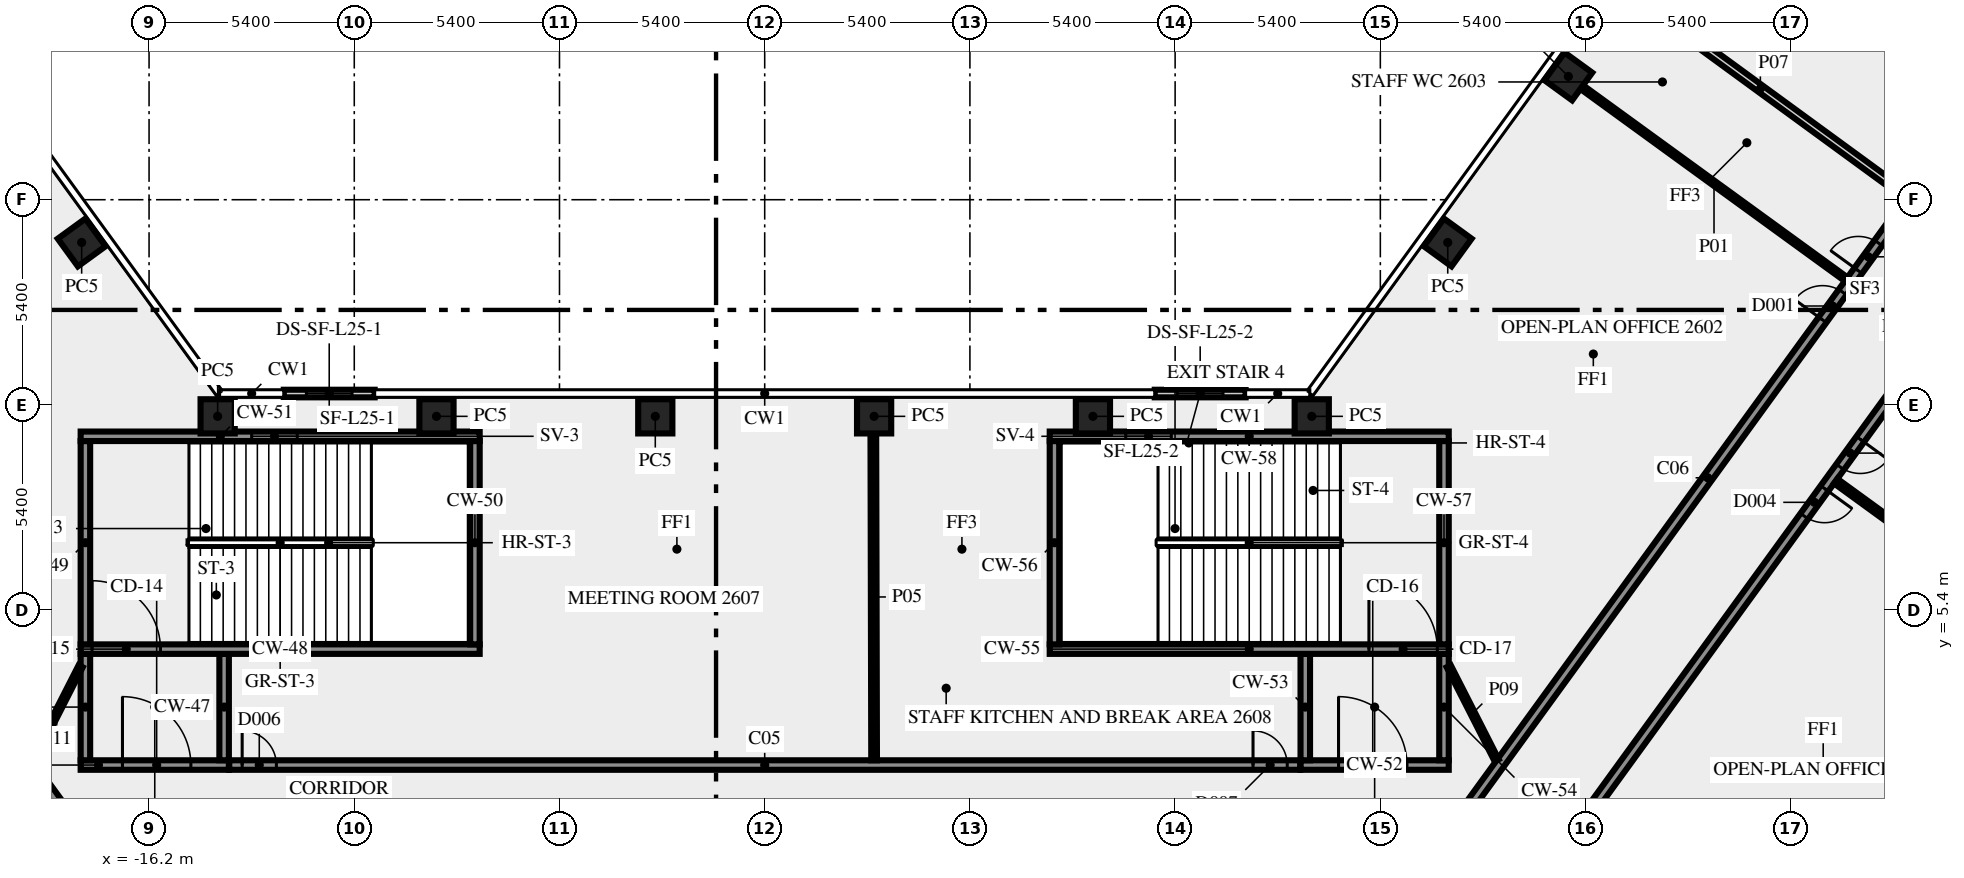
"""IFC4 building model, lengths in metres.
Left out: names, types, materials, properties, quantities, classifications, styles, units other than length and angle.
Written with IfcOpenShell. Run it as: python <this file> out.ifc"""

import sys

from ifc_helpers import new_model, si_unit, direction, frame, frame_2d, origin, origin_2d, place, context, subcontext, project, spatial, rectangle, extrude, element, fill, save


model = new_model("IFC4")
c1 = context("Model", 3, precision=1e-05, world=origin(), true_north=direction((0.0, 1.0)))
c2 = subcontext(c1, "Body", "Model", "MODEL_VIEW")
j1 = project(units=[si_unit("LENGTHUNIT", "METRE"), si_unit("PLANEANGLEUNIT", "RADIAN")], contexts=[c1])
p1 = place(None, origin())
s1 = spatial("IfcSite", under=j1, at=p1, CompositionType="ELEMENT")
p2 = place(p1, origin())
s2 = spatial("IfcBuilding", under=s1, at=p2, CompositionType="ELEMENT")
p3 = place(p2, frame((0.0, 0.0, 113.0)))
s3 = spatial("IfcBuildingStorey", under=s2, at=p3, CompositionType="ELEMENT", Elevation=113.0)
for number, where, z_axis, x_axis in (
    (1, (-17.974, 15.075, 0.0), (0.0, 0.0, 1.0), (-0.588, 0.809, 0.0)),
    (2, (21.147, 19.444, 0.0), (0.0, 0.0, 1.0), (-0.588, -0.809, 0.0)),
    (3, (17.974, 15.075, 0.0), (0.0, 0.0, 1.0), (-0.588, -0.809, 0.0)),
    (4, (14.395, 10.5, 0.0), (0.0, 0.0, 1.0), (-1.0, 0.0, 0.0)),
    (5, (8.637, 10.5, 0.0), (0.0, 0.0, 1.0), (-1.0, 0.0, 0.0)),
    (6, (2.879, 10.5, 0.0), (0.0, 0.0, 1.0), (-1.0, 0.0, 0.0)),
    (7, (-2.879, 10.5, 0.0), (0.0, 0.0, 1.0), (-1.0, 0.0, 0.0)),
    (8, (-8.637, 10.5, 0.0), (0.0, 0.0, 1.0), (-1.0, 0.0, 0.0)),
    (9, (-14.395, 10.5, 0.0), (0.0, 0.0, 1.0), (-1.0, 0.0, 0.0)),
):
    element("IfcColumn", number, at=place(p3, frame(where, z_axis=z_axis, x_axis=x_axis)), inside=s3, PredefinedType="COLUMN", context=c2, shape_type="SweptSolid", body=[
        extrude(rectangle(XDim=0.9, YDim=0.9, at=origin_2d()), origin(), (0.0, 0.0, 1.0), 3.65),
    ])
p4 = place(p3, frame((12.655, 11.1, 0.0), z_axis=(0.0, 0.0, 1.0), x_axis=(-1.0, 0.0, 0.0)))
e10 = element("IfcWall", 10, at=p4, inside=s3, PredefinedType="SOLIDWALL", context=c2, shape_type="SweptSolid", body=[
    extrude(rectangle(XDim=2.392, YDim=0.2, at=frame_2d((1.196, 0.0))), origin(), (0.0, 0.0, 1.0), 3.65),
])
p5 = place(p4, frame((0.596, 0.0, 1.0)))
e11 = element("IfcOpeningElement", 11, at=p5, cuts=e10, PredefinedType="OPENING", context=c2, shape_type="SweptSolid", body=[
    extrude(rectangle(XDim=1.2, YDim=1.2, at=frame_2d((0.6, 0.6))), frame((0.0, 0.11, 0.0), z_axis=(0.0, -1.0, 0.0), x_axis=(1.0, 0.0, 0.0)), (0.0, 0.0, 1.0), 0.22),
])
p6 = place(p3, frame((-10.263, 11.1, 0.0), z_axis=(0.0, 0.0, 1.0), x_axis=(-1.0, 0.0, 0.0)))
e12 = element("IfcWall", 12, at=p6, inside=s3, PredefinedType="SOLIDWALL", context=c2, shape_type="SweptSolid", body=[
    extrude(rectangle(XDim=2.392, YDim=0.2, at=frame_2d((1.196, 0.0))), origin(), (0.0, 0.0, 1.0), 3.65),
])
p7 = place(p6, frame((0.596, 0.0, 1.0)))
e13 = element("IfcOpeningElement", 13, at=p7, cuts=e12, PredefinedType="OPENING", context=c2, shape_type="SweptSolid", body=[
    extrude(rectangle(XDim=1.2, YDim=1.2, at=frame_2d((0.6, 0.6))), frame((0.0, 0.11, 0.0), z_axis=(0.0, -1.0, 0.0), x_axis=(1.0, 0.0, 0.0)), (0.0, 0.0, 1.0), 0.22),
])
p8 = place(p3, frame((-18.0, 1.325, 0.0), z_axis=(0.0, 0.0, 1.0), x_axis=(1.0, 0.0, 0.0)))
e14 = element("IfcWall", 14, at=p8, inside=s3, PredefinedType="SHEAR", context=c2, shape_type="SweptSolid", body=[
    extrude(rectangle(XDim=3.9, YDim=0.25, at=frame_2d((1.95, 0.0))), origin(), (0.0, 0.0, 1.0), 3.65),
])
p9 = place(p8, frame((1.1, 0.0, 0.0)))
e15 = element("IfcOpeningElement", 15, at=p9, cuts=e14, PredefinedType="OPENING", context=c2, shape_type="SweptSolid", body=[
    extrude(rectangle(XDim=1.8, YDim=2.1, at=frame_2d((0.9, 1.05))), frame((0.0, 0.135, 0.0), z_axis=(0.0, -1.0, 0.0), x_axis=(1.0, 0.0, 0.0)), (0.0, 0.0, 1.0), 0.27),
])
for number, where, z_axis, x_axis in (
    (16, (-17.875, 1.45, 0.0), (0.0, 0.0, 1.0), (0.0, 1.0, 0.0)),
    (17, (-14.225, 1.45, 0.0), (0.0, 0.0, 1.0), (0.0, 1.0, 0.0)),
):
    element("IfcWall", number, at=place(p3, frame(where, z_axis=z_axis, x_axis=x_axis)), inside=s3, PredefinedType="SHEAR", context=c2, shape_type="SweptSolid", body=[
        extrude(rectangle(XDim=2.8, YDim=0.25, at=frame_2d((1.4, 0.0))), origin(), (0.0, 0.0, 1.0), 3.65),
    ])
p10 = place(p3, frame((-18.0, 4.375, 0.0), z_axis=(0.0, 0.0, 1.0), x_axis=(1.0, 0.0, 0.0)))
e18 = element("IfcWall", 18, at=p10, inside=s3, PredefinedType="SHEAR", context=c2, shape_type="SweptSolid", body=[
    extrude(rectangle(XDim=10.5, YDim=0.25, at=frame_2d((5.25, 0.0))), origin(), (0.0, 0.0, 1.0), 3.65),
])
p11 = place(p10, frame((0.3, 0.0, 0.0)))
e19 = element("IfcOpeningElement", 19, at=p11, cuts=e18, PredefinedType="OPENING", context=c2, shape_type="SweptSolid", body=[
    extrude(rectangle(XDim=1.8, YDim=2.1, at=frame_2d((0.9, 1.05))), frame((0.0, 0.135, 0.0), z_axis=(0.0, -1.0, 0.0), x_axis=(1.0, 0.0, 0.0)), (0.0, 0.0, 1.0), 0.27),
])
for number, where, z_axis, x_axis in (
    (20, (-17.875, 4.5, 0.0), (0.0, 0.0, 1.0), (0.0, 1.0, 0.0)),
    (21, (-7.625, 4.5, 0.0), (0.0, 0.0, 1.0), (0.0, 1.0, 0.0)),
):
    element("IfcWall", number, at=place(p3, frame(where, z_axis=z_axis, x_axis=x_axis)), inside=s3, PredefinedType="SHEAR", context=c2, shape_type="SweptSolid", body=[
        extrude(rectangle(XDim=5.35, YDim=0.25, at=frame_2d((2.675, 0.0))), origin(), (0.0, 0.0, 1.0), 3.65),
    ])
p12 = place(p3, frame((-18.0, 9.975, 0.0), z_axis=(0.0, 0.0, 1.0), x_axis=(1.0, 0.0, 0.0)))
e22 = element("IfcWall", 22, at=p12, inside=s3, PredefinedType="SHEAR", context=c2, shape_type="SweptSolid", body=[
    extrude(rectangle(XDim=10.5, YDim=0.25, at=frame_2d((5.25, 0.0))), origin(), (0.0, 0.0, 1.0), 3.65),
])
p13 = place(p12, frame((4.5, 0.0, 1.0)))
e23 = element("IfcOpeningElement", 23, at=p13, cuts=e22, PredefinedType="OPENING", context=c2, shape_type="SweptSolid", body=[
    extrude(rectangle(XDim=1.2, YDim=1.2, at=frame_2d((0.6, 0.6))), frame((0.0, 0.135, 0.0), z_axis=(0.0, -1.0, 0.0), x_axis=(1.0, 0.0, 0.0)), (0.0, 0.0, 1.0), 0.27),
])
p14 = place(p3, frame((14.1, 1.325, 0.0), z_axis=(0.0, 0.0, 1.0), x_axis=(1.0, 0.0, 0.0)))
e24 = element("IfcWall", 24, at=p14, inside=s3, PredefinedType="SHEAR", context=c2, shape_type="SweptSolid", body=[
    extrude(rectangle(XDim=3.9, YDim=0.25, at=frame_2d((1.95, 0.0))), origin(), (0.0, 0.0, 1.0), 3.65),
])
p15 = place(p14, frame((1.0, 0.0, 0.0)))
e25 = element("IfcOpeningElement", 25, at=p15, cuts=e24, PredefinedType="OPENING", context=c2, shape_type="SweptSolid", body=[
    extrude(rectangle(XDim=1.8, YDim=2.1, at=frame_2d((0.9, 1.05))), frame((0.0, 0.135, 0.0), z_axis=(0.0, -1.0, 0.0), x_axis=(1.0, 0.0, 0.0)), (0.0, 0.0, 1.0), 0.27),
])
for number, where, z_axis, x_axis in (
    (26, (14.225, 1.45, 0.0), (0.0, 0.0, 1.0), (0.0, 1.0, 0.0)),
    (27, (17.875, 1.45, 0.0), (0.0, 0.0, 1.0), (0.0, 1.0, 0.0)),
):
    element("IfcWall", number, at=place(p3, frame(where, z_axis=z_axis, x_axis=x_axis)), inside=s3, PredefinedType="SHEAR", context=c2, shape_type="SweptSolid", body=[
        extrude(rectangle(XDim=2.8, YDim=0.25, at=frame_2d((1.4, 0.0))), origin(), (0.0, 0.0, 1.0), 3.65),
    ])
p16 = place(p3, frame((7.5, 4.375, 0.0), z_axis=(0.0, 0.0, 1.0), x_axis=(1.0, 0.0, 0.0)))
e28 = element("IfcWall", 28, at=p16, inside=s3, PredefinedType="SHEAR", context=c2, shape_type="SweptSolid", body=[
    extrude(rectangle(XDim=10.5, YDim=0.25, at=frame_2d((5.25, 0.0))), origin(), (0.0, 0.0, 1.0), 3.65),
])
p17 = place(p16, frame((8.4, 0.0, 0.0)))
e29 = element("IfcOpeningElement", 29, at=p17, cuts=e28, PredefinedType="OPENING", context=c2, shape_type="SweptSolid", body=[
    extrude(rectangle(XDim=1.8, YDim=2.1, at=frame_2d((0.9, 1.05))), frame((0.0, 0.135, 0.0), z_axis=(0.0, -1.0, 0.0), x_axis=(1.0, 0.0, 0.0)), (0.0, 0.0, 1.0), 0.27),
])
for number, where, z_axis, x_axis in (
    (30, (7.625, 4.5, 0.0), (0.0, 0.0, 1.0), (0.0, 1.0, 0.0)),
    (31, (17.875, 4.5, 0.0), (0.0, 0.0, 1.0), (0.0, 1.0, 0.0)),
):
    element("IfcWall", number, at=place(p3, frame(where, z_axis=z_axis, x_axis=x_axis)), inside=s3, PredefinedType="SHEAR", context=c2, shape_type="SweptSolid", body=[
        extrude(rectangle(XDim=5.35, YDim=0.25, at=frame_2d((2.675, 0.0))), origin(), (0.0, 0.0, 1.0), 3.65),
    ])
p18 = place(p3, frame((7.5, 9.975, 0.0), z_axis=(0.0, 0.0, 1.0), x_axis=(1.0, 0.0, 0.0)))
e32 = element("IfcWall", 32, at=p18, inside=s3, PredefinedType="SHEAR", context=c2, shape_type="SweptSolid", body=[
    extrude(rectangle(XDim=10.5, YDim=0.25, at=frame_2d((5.25, 0.0))), origin(), (0.0, 0.0, 1.0), 3.65),
])
p19 = place(p18, frame((2.0, 0.0, 1.0)))
e33 = element("IfcOpeningElement", 33, at=p19, cuts=e32, PredefinedType="OPENING", context=c2, shape_type="SweptSolid", body=[
    extrude(rectangle(XDim=1.2, YDim=1.2, at=frame_2d((0.6, 0.6))), frame((0.0, 0.135, 0.0), z_axis=(0.0, -1.0, 0.0), x_axis=(1.0, 0.0, 0.0)), (0.0, 0.0, 1.0), 0.27),
])
p20 = place(p3, frame((40.463, 25.911, 0.0), z_axis=(0.0, 0.0, 1.0), x_axis=(-0.587781654618, -0.809019608226, 0.0)))
e34 = element("IfcWall", 34, at=p20, inside=s3, PredefinedType="SOLIDWALL", context=c2, shape_type="SweptSolid", body=[
    extrude(rectangle(XDim=33.911, YDim=0.25, at=frame_2d((16.956, 0.0))), origin(), (0.0, 0.0, 1.0), 3.65),
])
p21 = place(p20, frame((21.396, 0.0, 0.0)))
e35 = element("IfcOpeningElement", 35, at=p21, cuts=e34, PredefinedType="OPENING", context=c2, shape_type="SweptSolid", body=[
    extrude(rectangle(XDim=0.9, YDim=2.1, at=frame_2d((0.45, 1.05))), frame((0.0, 0.135, 0.0), z_axis=(0.0, -1.0, 0.0), x_axis=(1.0, 0.0, 0.0)), (0.0, 0.0, 1.0), 0.27),
])
p22 = place(p20, frame((19.795, 0.0, 0.0)))
e36 = element("IfcOpeningElement", 36, at=p22, cuts=e34, PredefinedType="OPENING", context=c2, shape_type="SweptSolid", body=[
    extrude(rectangle(XDim=0.9, YDim=2.1, at=frame_2d((0.45, 1.05))), frame((0.0, 0.135, 0.0), z_axis=(0.0, -1.0, 0.0), x_axis=(1.0, 0.0, 0.0)), (0.0, 0.0, 1.0), 0.27),
])
p23 = place(p3, frame((-37.232, 25.972, 0.0), z_axis=(0.0, 0.0, 1.0), x_axis=(0.587786323093, -0.809016216391, 0.0)))
e37 = element("IfcWall", 37, at=p23, inside=s3, PredefinedType="SOLIDWALL", context=c2, shape_type="SweptSolid", body=[
    extrude(rectangle(XDim=33.493, YDim=0.25, at=frame_2d((16.747, 0.0))), origin(), (0.0, 0.0, 1.0), 3.65),
])
p24 = place(p23, frame((5.385, 0.0, 0.0)))
e38 = element("IfcOpeningElement", 38, at=p24, cuts=e37, PredefinedType="OPENING", context=c2, shape_type="SweptSolid", body=[
    extrude(rectangle(XDim=0.9, YDim=2.1, at=frame_2d((0.45, 1.05))), frame((0.0, 0.135, 0.0), z_axis=(0.0, -1.0, 0.0), x_axis=(1.0, 0.0, 0.0)), (0.0, 0.0, 1.0), 0.27),
])
p25 = place(p23, frame((6.985, 0.0, 0.0)))
e39 = element("IfcOpeningElement", 39, at=p25, cuts=e37, PredefinedType="OPENING", context=c2, shape_type="SweptSolid", body=[
    extrude(rectangle(XDim=0.9, YDim=2.1, at=frame_2d((0.45, 1.05))), frame((0.0, 0.135, 0.0), z_axis=(0.0, -1.0, 0.0), x_axis=(1.0, 0.0, 0.0)), (0.0, 0.0, 1.0), 0.27),
])
p26 = place(p3, frame((-14.09, 1.325, 0.0), z_axis=(0.0, 0.0, 1.0), x_axis=(1.0, 0.0, 0.0)))
e40 = element("IfcWall", 40, at=p26, inside=s3, PredefinedType="SOLIDWALL", context=c2, shape_type="SweptSolid", body=[
    extrude(rectangle(XDim=28.18, YDim=0.25, at=frame_2d((14.09, 0.0))), origin(), (0.0, 0.0, 1.0), 3.65),
])
p27 = place(p26, frame((0.34, 0.0, 0.0)))
e41 = element("IfcOpeningElement", 41, at=p27, cuts=e40, PredefinedType="OPENING", context=c2, shape_type="SweptSolid", body=[
    extrude(rectangle(XDim=0.9, YDim=2.1, at=frame_2d((0.45, 1.05))), frame((0.0, 0.135, 0.0), z_axis=(0.0, -1.0, 0.0), x_axis=(1.0, 0.0, 0.0)), (0.0, 0.0, 1.0), 0.27),
])
p28 = place(p26, frame((26.94, 0.0, 0.0)))
e42 = element("IfcOpeningElement", 42, at=p28, cuts=e40, PredefinedType="OPENING", context=c2, shape_type="SweptSolid", body=[
    extrude(rectangle(XDim=0.9, YDim=2.1, at=frame_2d((0.45, 1.05))), frame((0.0, 0.135, 0.0), z_axis=(0.0, -1.0, 0.0), x_axis=(1.0, 0.0, 0.0)), (0.0, 0.0, 1.0), 0.27),
])
p29 = place(p3, frame((17.545, -1.125, 0.0), z_axis=(0.0, 0.0, 1.0), x_axis=(0.587788021768, 0.809014982226, 0.0)))
e43 = element("IfcWall", 43, at=p29, inside=s3, PredefinedType="SOLIDWALL", context=c2, shape_type="SweptSolid", body=[
    extrude(rectangle(XDim=35.344, YDim=0.25, at=frame_2d((17.672, 0.0))), origin(), (0.0, 0.0, 1.0), 3.65),
])
p30 = place(p29, frame((17.508, 0.0, 0.0)))
e44 = element("IfcOpeningElement", 44, at=p30, cuts=e43, PredefinedType="OPENING", context=c2, shape_type="SweptSolid", body=[
    extrude(rectangle(XDim=0.9, YDim=2.1, at=frame_2d((0.45, 1.05))), frame((0.0, 0.135, 0.0), z_axis=(0.0, -1.0, 0.0), x_axis=(1.0, 0.0, 0.0)), (0.0, 0.0, 1.0), 0.27),
])
p31 = place(p29, frame((21.808, 0.0, 0.0)))
e45 = element("IfcOpeningElement", 45, at=p31, cuts=e43, PredefinedType="OPENING", context=c2, shape_type="SweptSolid", body=[
    extrude(rectangle(XDim=0.9, YDim=2.1, at=frame_2d((0.45, 1.05))), frame((0.0, 0.135, 0.0), z_axis=(0.0, -1.0, 0.0), x_axis=(1.0, 0.0, 0.0)), (0.0, 0.0, 1.0), 0.27),
])
p32 = place(p29, frame((19.108, 0.0, 0.0)))
e46 = element("IfcOpeningElement", 46, at=p32, cuts=e43, PredefinedType="OPENING", context=c2, shape_type="SweptSolid", body=[
    extrude(rectangle(XDim=0.9, YDim=2.1, at=frame_2d((0.45, 1.05))), frame((0.0, 0.135, 0.0), z_axis=(0.0, -1.0, 0.0), x_axis=(1.0, 0.0, 0.0)), (0.0, 0.0, 1.0), 0.27),
])
p33 = place(p3, frame((28.457, 14.108, 0.0), z_axis=(0.0, 0.0, 1.0), x_axis=(-0.808998863664, 0.587810206266, 0.0)))
e47 = element("IfcWall", 47, at=p33, inside=s3, PredefinedType="PARTITIONING", context=c2, shape_type="SweptSolid", body=[
    extrude(rectangle(XDim=8.595, YDim=0.12, at=frame_2d((4.297, 0.0))), origin(), (0.0, 0.0, 1.0), 3.65),
])
p34 = place(p3, frame((35.909, 3.183, 0.0), z_axis=(0.0, 0.0, 1.0), x_axis=(-0.809045492695, 0.587746025721, 0.0)))
e48 = element("IfcWall", 48, at=p34, inside=s3, PredefinedType="PARTITIONING", context=c2, shape_type="SweptSolid", body=[
    extrude(rectangle(XDim=9.551, YDim=0.15, at=frame_2d((4.775, 0.0))), origin(), (0.0, 0.0, 1.0), 2.75),
])
p35 = place(p3, frame((2.879, 1.45, 0.0), z_axis=(0.0, 0.0, 1.0), x_axis=(-0.002357613104, 0.999997220826, 0.0)))
e49 = element("IfcWall", 49, at=p35, inside=s3, PredefinedType="PARTITIONING", context=c2, shape_type="SweptSolid", body=[
    extrude(rectangle(XDim=8.595, YDim=0.15, at=frame_2d((4.297, 0.0))), origin(), (0.0, 0.0, 1.0), 3.65),
])
p36 = place(p3, frame((22.344, 21.94, 0.0), z_axis=(0.0, 0.0, 1.0), x_axis=(0.807610282865, -0.589716568371, 0.0)))
e50 = element("IfcWall", 50, at=p36, inside=s3, PredefinedType="SOLIDWALL", context=c2, shape_type="SweptSolid", body=[
    extrude(rectangle(XDim=9.55, YDim=0.2, at=frame_2d((4.775, 0.0))), origin(), (0.0, 0.0, 1.0), 2.75),
])
for number, where, z_axis, x_axis in (
    (51, (18.0, 3.925, 0.0), (0.0, 0.0, 1.0), (0.454, -0.891, 0.0)),
    (52, (-19.261, 1.45, 0.0), (0.0, 0.0, 1.0), (0.454, 0.891, 0.0)),
):
    element("IfcWall", number, at=place(p3, frame(where, z_axis=z_axis, x_axis=x_axis)), inside=s3, PredefinedType="PARTITIONING", context=c2, shape_type="SweptSolid", body=[
        extrude(rectangle(XDim=2.778, YDim=0.12, at=frame_2d((1.389, 0.0))), origin(), (0.0, 0.0, 1.0), 3.65),
    ])
p37 = place(p5, origin())
e53 = element("IfcWindow", 53, at=p37, inside=s3, PartitioningType="SINGLE_PANEL", PredefinedType="WINDOW", context=c2, shape_type="SweptSolid", body=[
    extrude(rectangle(XDim=1.2, YDim=1.2, at=frame_2d((0.6, 0.6))), frame((0.0, 0.03, 0.0), z_axis=(0.0, -1.0, 0.0), x_axis=(1.0, 0.0, 0.0)), (0.0, 0.0, 1.0), 0.06),
])
fill(e11, e53)
p38 = place(p7, origin())
e54 = element("IfcWindow", 54, at=p38, inside=s3, PartitioningType="SINGLE_PANEL", PredefinedType="WINDOW", context=c2, shape_type="SweptSolid", body=[
    extrude(rectangle(XDim=1.2, YDim=1.2, at=frame_2d((0.6, 0.6))), frame((0.0, 0.03, 0.0), z_axis=(0.0, -1.0, 0.0), x_axis=(1.0, 0.0, 0.0)), (0.0, 0.0, 1.0), 0.06),
])
fill(e13, e54)
p39 = place(p9, origin())
e55 = element("IfcDoor", 55, at=p39, inside=s3, OperationType="DOUBLE_DOOR_SINGLE_SWING", PredefinedType="DOOR", context=c2, shape_type="SweptSolid", body=[
    extrude(rectangle(XDim=1.8, YDim=2.1, at=frame_2d((0.9, 1.05))), frame((0.0, 0.025, 0.0), z_axis=(0.0, -1.0, 0.0), x_axis=(1.0, 0.0, 0.0)), (0.0, 0.0, 1.0), 0.05),
])
fill(e15, e55)
p40 = place(p11, origin())
e56 = element("IfcDoor", 56, at=p40, inside=s3, OperationType="DOUBLE_DOOR_SINGLE_SWING", PredefinedType="DOOR", context=c2, shape_type="SweptSolid", body=[
    extrude(rectangle(XDim=1.8, YDim=2.1, at=frame_2d((0.9, 1.05))), frame((0.0, 0.025, 0.0), z_axis=(0.0, -1.0, 0.0), x_axis=(1.0, 0.0, 0.0)), (0.0, 0.0, 1.0), 0.05),
])
fill(e19, e56)
p41 = place(p13, origin())
e57 = element("IfcWindow", 57, at=p41, inside=s3, PartitioningType="SINGLE_PANEL", PredefinedType="WINDOW", context=c2, shape_type="SweptSolid", body=[
    extrude(rectangle(XDim=1.2, YDim=1.2, at=frame_2d((0.6, 0.6))), frame((0.0, 0.03, 0.0), z_axis=(0.0, -1.0, 0.0), x_axis=(1.0, 0.0, 0.0)), (0.0, 0.0, 1.0), 0.06),
])
fill(e23, e57)
p42 = place(p15, origin())
e58 = element("IfcDoor", 58, at=p42, inside=s3, OperationType="DOUBLE_DOOR_SINGLE_SWING", PredefinedType="DOOR", context=c2, shape_type="SweptSolid", body=[
    extrude(rectangle(XDim=1.8, YDim=2.1, at=frame_2d((0.9, 1.05))), frame((0.0, 0.025, 0.0), z_axis=(0.0, -1.0, 0.0), x_axis=(1.0, 0.0, 0.0)), (0.0, 0.0, 1.0), 0.05),
])
fill(e25, e58)
p43 = place(p17, origin())
e59 = element("IfcDoor", 59, at=p43, inside=s3, OperationType="DOUBLE_DOOR_SINGLE_SWING", PredefinedType="DOOR", context=c2, shape_type="SweptSolid", body=[
    extrude(rectangle(XDim=1.8, YDim=2.1, at=frame_2d((0.9, 1.05))), frame((0.0, 0.025, 0.0), z_axis=(0.0, -1.0, 0.0), x_axis=(1.0, 0.0, 0.0)), (0.0, 0.0, 1.0), 0.05),
])
fill(e29, e59)
p44 = place(p19, origin())
e60 = element("IfcWindow", 60, at=p44, inside=s3, PartitioningType="SINGLE_PANEL", PredefinedType="WINDOW", context=c2, shape_type="SweptSolid", body=[
    extrude(rectangle(XDim=1.2, YDim=1.2, at=frame_2d((0.6, 0.6))), frame((0.0, 0.03, 0.0), z_axis=(0.0, -1.0, 0.0), x_axis=(1.0, 0.0, 0.0)), (0.0, 0.0, 1.0), 0.06),
])
fill(e33, e60)
p45 = place(p30, origin())
e61 = element("IfcDoor", 61, at=p45, inside=s3, OperationType="SINGLE_SWING_RIGHT", PredefinedType="DOOR", context=c2, shape_type="SweptSolid", body=[
    extrude(rectangle(XDim=0.9, YDim=2.1, at=frame_2d((0.45, 1.05))), frame((0.0, 0.025, 0.0), z_axis=(0.0, -1.0, 0.0), x_axis=(1.0, 0.0, 0.0)), (0.0, 0.0, 1.0), 0.05),
])
fill(e44, e61)
p46 = place(p21, origin())
e62 = element("IfcDoor", 62, at=p46, inside=s3, OperationType="SINGLE_SWING_LEFT", PredefinedType="DOOR", context=c2, shape_type="SweptSolid", body=[
    extrude(rectangle(XDim=0.9, YDim=2.1, at=frame_2d((0.45, 1.05))), frame((0.0, 0.025, 0.0), z_axis=(0.0, -1.0, 0.0), x_axis=(1.0, 0.0, 0.0)), (0.0, 0.0, 1.0), 0.05),
])
fill(e35, e62)
p47 = place(p22, origin())
e63 = element("IfcDoor", 63, at=p47, inside=s3, OperationType="SINGLE_SWING_RIGHT", PredefinedType="DOOR", context=c2, shape_type="SweptSolid", body=[
    extrude(rectangle(XDim=0.9, YDim=2.1, at=frame_2d((0.45, 1.05))), frame((0.0, 0.025, 0.0), z_axis=(0.0, -1.0, 0.0), x_axis=(1.0, 0.0, 0.0)), (0.0, 0.0, 1.0), 0.05),
])
fill(e36, e63)
p48 = place(p27, origin())
e64 = element("IfcDoor", 64, at=p48, inside=s3, OperationType="SINGLE_SWING_LEFT", PredefinedType="DOOR", context=c2, shape_type="SweptSolid", body=[
    extrude(rectangle(XDim=0.9, YDim=2.1, at=frame_2d((0.45, 1.05))), frame((0.0, 0.025, 0.0), z_axis=(0.0, -1.0, 0.0), x_axis=(1.0, 0.0, 0.0)), (0.0, 0.0, 1.0), 0.05),
])
fill(e41, e64)
p49 = place(p28, origin())
e65 = element("IfcDoor", 65, at=p49, inside=s3, OperationType="SINGLE_SWING_RIGHT", PredefinedType="DOOR", context=c2, shape_type="SweptSolid", body=[
    extrude(rectangle(XDim=0.9, YDim=2.1, at=frame_2d((0.45, 1.05))), frame((0.0, 0.025, 0.0), z_axis=(0.0, -1.0, 0.0), x_axis=(1.0, 0.0, 0.0)), (0.0, 0.0, 1.0), 0.05),
])
fill(e42, e65)
p50 = place(p32, origin())
e66 = element("IfcDoor", 66, at=p50, inside=s3, OperationType="SINGLE_SWING_LEFT", PredefinedType="DOOR", context=c2, shape_type="SweptSolid", body=[
    extrude(rectangle(XDim=0.9, YDim=2.1, at=frame_2d((0.45, 1.05))), frame((0.0, 0.025, 0.0), z_axis=(0.0, -1.0, 0.0), x_axis=(1.0, 0.0, 0.0)), (0.0, 0.0, 1.0), 0.05),
])
fill(e46, e66)
save(model, sys.argv[1])
